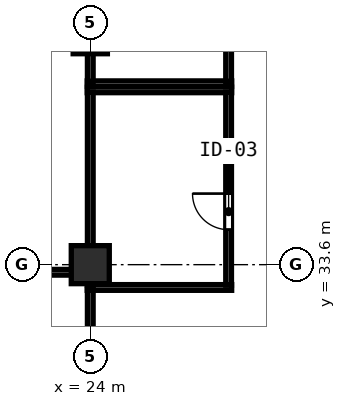
"""IFC4 building model, lengths in metres.
Left out: names, types, materials, properties, quantities, classifications, styles, units other than length and angle.
Written with IfcOpenShell. Run it as: python <this file> out.ifc"""

import sys

from ifc_helpers import new_model, si_unit, direction, frame, frame_2d, origin, origin_2d, place, context, subcontext, project, spatial, rectangle, hollow_rectangle, extrude, element, fill, save


model = new_model("IFC4")
c1 = context("Model", 3, precision=1e-05, world=origin(), true_north=direction((0.0, 1.0)))
c2 = subcontext(c1, "Body", "Model", "MODEL_VIEW")
j1 = project(units=[si_unit("LENGTHUNIT", "METRE"), si_unit("PLANEANGLEUNIT", "RADIAN")], contexts=[c1])
p1 = place(None, origin())
s1 = spatial("IfcSite", under=j1, at=p1, CompositionType="ELEMENT")
p2 = place(p1, origin())
s2 = spatial("IfcBuilding", under=s1, at=p2, CompositionType="ELEMENT")
p3 = place(p2, frame((0.0, 0.0, 98.4)))
s3 = spatial("IfcBuildingStorey", under=s2, at=p3, CompositionType="ELEMENT", Elevation=98.4)
p4 = place(p3, frame((24.0, 33.6, 0.0), z_axis=(0.0, 0.0, 1.0), x_axis=(1.0, 0.0, 0.0)))
e1 = element("IfcColumn", 1, at=p4, inside=s3, PredefinedType="COLUMN", context=c2, shape_type="SweptSolid", body=[
    extrude(hollow_rectangle(XDim=1.0, YDim=1.0, WallThickness=0.038, at=origin_2d()), origin(), (0.0, 0.0, 1.0), 3.8),
])
p5 = place(p3, frame((24.0, 39.6, 0.0), z_axis=(0.0, 0.0, 1.0), x_axis=(1.0, 0.0, 0.0)))
e2 = element("IfcColumn", 2, at=p5, inside=s3, PredefinedType="COLUMN", context=c2, shape_type="SweptSolid", body=[
    extrude(hollow_rectangle(XDim=0.9, YDim=0.9, WallThickness=0.034, at=origin_2d()), origin(), (0.0, 0.0, 1.0), 3.8),
])
for number, where, z_axis, x_axis in (
    (3, (23.92, 38.2, 0.0), (0.0, 0.0, 1.0), (1.0, 0.0, 0.0)),
    (4, (23.92, 33.0, 0.0), (0.0, 0.0, 1.0), (1.0, 0.0, 0.0)),
):
    element("IfcWall", number, at=place(p3, frame(where, z_axis=z_axis, x_axis=x_axis)), inside=s3, PredefinedType="PARTITIONING", context=c2, shape_type="SweptSolid", body=[
        extrude(rectangle(XDim=3.8, YDim=0.15, at=frame_2d((1.9, 0.0))), origin(), (0.0, 0.0, 1.0), 3.6),
    ])
p6 = place(p3, frame((24.0, 33.06, 0.0), z_axis=(0.0, 0.0, 1.0), x_axis=(0.0, 1.0, 0.0)))
e5 = element("IfcWall", 5, at=p6, inside=s3, PredefinedType="PARTITIONING", context=c2, shape_type="SweptSolid", body=[
    extrude(rectangle(XDim=5.08, YDim=0.15, at=frame_2d((2.54, 0.0))), origin(), (0.0, 0.0, 1.0), 3.145),
])
p7 = place(p3, frame((27.64, 33.06, 0.0), z_axis=(0.0, 0.0, 1.0), x_axis=(0.0, 1.0, 0.0)))
e6 = element("IfcWall", 6, at=p7, inside=s3, PredefinedType="PARTITIONING", context=c2, shape_type="SweptSolid", body=[
    extrude(rectangle(XDim=5.08, YDim=0.15, at=frame_2d((2.54, 0.0))), origin(), (0.0, 0.0, 1.0), 3.6),
])
p8 = place(p7, frame((2.41, 0.0, 0.0), z_axis=(0.0, 0.0, 1.0), x_axis=(-1.0, 0.0, 0.0)))
e7 = element("IfcOpeningElement", 7, at=p8, cuts=e6, PredefinedType="OPENING", context=c2, shape_type="SweptSolid", body=[
    extrude(rectangle(XDim=0.95, YDim=2.12, at=frame_2d((0.475, 1.06))), frame((0.0, 0.085, 0.0), z_axis=(0.0, -1.0, 0.0), x_axis=(1.0, 0.0, 0.0)), (0.0, 0.0, 1.0), 0.17),
])
p9 = place(p3, frame((23.92, 38.36, 0.0), z_axis=(0.0, 0.0, 1.0), x_axis=(1.0, 0.0, 0.0)))
e8 = element("IfcWall", 8, at=p9, inside=s3, PredefinedType="PARTITIONING", context=c2, shape_type="SweptSolid", body=[
    extrude(rectangle(XDim=3.8, YDim=0.15, at=frame_2d((1.9, 0.0))), origin(), (0.0, 0.0, 1.0), 3.6),
])
p10 = place(p3, frame((24.0, 38.42, 0.0), z_axis=(0.0, 0.0, 1.0), x_axis=(0.0, 1.0, 0.0)))
e9 = element("IfcWall", 9, at=p10, inside=s3, PredefinedType="PARTITIONING", context=c2, shape_type="SweptSolid", body=[
    extrude(rectangle(XDim=5.743, YDim=0.15, at=frame_2d((2.872, 0.0))), origin(), (0.0, 0.0, 1.0), 3.145),
])
p11 = place(p3, frame((27.64, 38.42, 0.0), z_axis=(0.0, 0.0, 1.0), x_axis=(0.0, 1.0, 0.0)))
e10 = element("IfcWall", 10, at=p11, inside=s3, PredefinedType="PARTITIONING", context=c2, shape_type="SweptSolid", body=[
    extrude(rectangle(XDim=7.54, YDim=0.15, at=frame_2d((3.77, 0.0))), origin(), (0.0, 0.0, 1.0), 3.6),
])
p12 = place(p11, frame((3.01, 0.0, 0.0), z_axis=(0.0, 0.0, 1.0), x_axis=(-1.0, 0.0, 0.0)))
e11 = element("IfcOpeningElement", 11, at=p12, cuts=e10, PredefinedType="OPENING", context=c2, shape_type="SweptSolid", body=[
    extrude(rectangle(XDim=0.95, YDim=2.12, at=frame_2d((0.475, 1.06))), frame((0.0, 0.085, 0.0), z_axis=(0.0, -1.0, 0.0), x_axis=(1.0, 0.0, 0.0)), (0.0, 0.0, 1.0), 0.17),
])
p13 = place(p3, frame((20.5, 33.4, 0.0), z_axis=(0.0, 0.0, 1.0), x_axis=(1.0, 0.0, 0.0)))
e12 = element("IfcWall", 12, at=p13, inside=s3, PredefinedType="PARTITIONING", context=c2, shape_type="SweptSolid", body=[
    extrude(rectangle(XDim=3.44, YDim=0.15, at=frame_2d((1.72, 0.0))), origin(), (0.0, 0.0, 1.0), 3.6),
])
p14 = place(p3, frame((24.0, 26.34, 0.0), z_axis=(0.0, 0.0, 1.0), x_axis=(0.0, 1.0, 0.0)))
e13 = element("IfcWall", 13, at=p14, inside=s3, PredefinedType="PARTITIONING", context=c2, shape_type="SweptSolid", body=[
    extrude(rectangle(XDim=6.6, YDim=0.15, at=frame_2d((3.3, 0.0))), origin(), (0.0, 0.0, 1.0), 3.145),
])
p15 = place(p8, origin())
e14 = element("IfcDoor", 14, at=p15, inside=s3, OperationType="SINGLE_SWING_LEFT", PredefinedType="DOOR", context=c2, shape_type="SweptSolid", body=[
    extrude(rectangle(XDim=0.95, YDim=2.12, at=frame_2d((0.475, 1.06))), frame((0.0, 0.025, 0.0), z_axis=(0.0, -1.0, 0.0), x_axis=(1.0, 0.0, 0.0)), (0.0, 0.0, 1.0), 0.05),
])
fill(e7, e14)
save(model, sys.argv[1])
